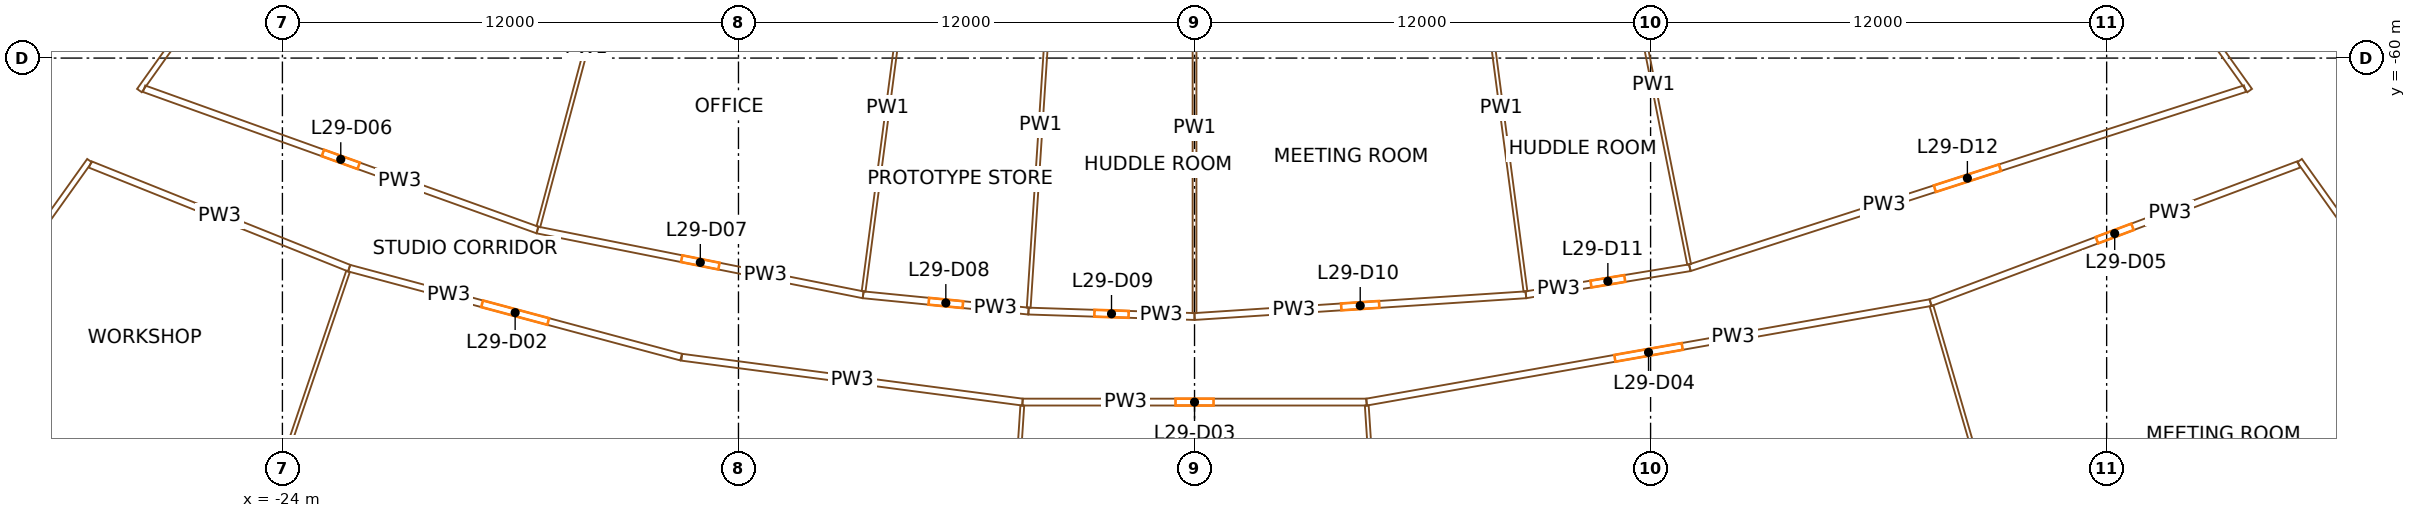
"""IFC4 building model, lengths in metres.
Left out: names, types, materials, properties, quantities, classifications, styles, units other than length and angle.
Written with IfcOpenShell. Run it as: python <this file> out.ifc"""

import sys

from ifc_helpers import new_model, si_unit, direction, frame, frame_2d, origin, place, context, subcontext, project, spatial, rectangle, extrude, element, fill, save


model = new_model("IFC4")
c1 = context("Model", 3, precision=1e-05, world=origin(), true_north=direction((0.0, 1.0)))
c2 = subcontext(c1, "Body", "Model", "MODEL_VIEW")
j1 = project(units=[si_unit("LENGTHUNIT", "METRE"), si_unit("PLANEANGLEUNIT", "RADIAN")], contexts=[c1])
p1 = place(None, origin())
s1 = spatial("IfcSite", under=j1, at=p1, CompositionType="ELEMENT")
p2 = place(p1, origin())
s2 = spatial("IfcBuilding", under=s1, at=p2, CompositionType="ELEMENT")
p3 = place(p2, frame((0.0, 0.0, 129.1)))
s3 = spatial("IfcBuildingStorey", under=s2, at=p3, CompositionType="ELEMENT", Elevation=129.1)
p4 = place(p3, frame((-36.717, -66.337, 0.0), z_axis=(0.0, 0.0, 1.0), x_axis=(0.573577477574, 0.819151315216, 0.0)))
e1 = element("IfcWall", 1, at=p4, inside=s3, PredefinedType="SHEAR", context=c2, shape_type="SweptSolid", body=[
    extrude(rectangle(XDim=14.8, YDim=0.9, at=frame_2d((7.4, 0.0))), origin(), (0.0, 0.0, 1.0), 3.5),
])
p5 = place(p4, frame((6.2, 0.0, 0.0)))
e2 = element("IfcOpeningElement", 2, at=p5, cuts=e1, PredefinedType="OPENING", context=c2, shape_type="SweptSolid", body=[
    extrude(rectangle(XDim=2.4, YDim=2.1, at=frame_2d((1.2, 1.05))), frame((0.0, 0.46, 0.0), z_axis=(0.0, -1.0, 0.0), x_axis=(1.0, 0.0, 0.0)), (0.0, 0.0, 1.0), 0.92),
])
p6 = place(p3, frame((36.717, -66.337, 0.0), z_axis=(0.0, 0.0, 1.0), x_axis=(-0.573577477574, 0.819151315216, 0.0)))
e3 = element("IfcWall", 3, at=p6, inside=s3, PredefinedType="SHEAR", context=c2, shape_type="SweptSolid", body=[
    extrude(rectangle(XDim=14.8, YDim=0.9, at=frame_2d((7.4, 0.0))), origin(), (0.0, 0.0, 1.0), 3.5),
])
p7 = place(p6, frame((6.2, 0.0, 0.0)))
e4 = element("IfcOpeningElement", 4, at=p7, cuts=e3, PredefinedType="OPENING", context=c2, shape_type="SweptSolid", body=[
    extrude(rectangle(XDim=2.4, YDim=2.1, at=frame_2d((1.2, 1.05))), frame((0.0, 0.46, 0.0), z_axis=(0.0, -1.0, 0.0), x_axis=(1.0, 0.0, 0.0)), (0.0, 0.0, 1.0), 0.92),
])
p8 = place(p3, frame((-29.075, -62.698, 0.0), z_axis=(0.0, 0.0, 1.0), x_axis=(-0.58002146853, -0.814601188339, 0.0)))
e5 = element("IfcWall", 5, at=p8, inside=s3, PredefinedType="PARTITIONING", context=c2, shape_type="SweptSolid", body=[
    extrude(rectangle(XDim=10.141, YDim=0.15, at=frame_2d((5.071, 0.0))), origin(), (0.0, 0.0, 1.0), 2.4),
])
p9 = place(p8, frame((4.571, 0.0, 0.0)))
e6 = element("IfcOpeningElement", 6, at=p9, cuts=e5, PredefinedType="OPENING", context=c2, shape_type="SweptSolid", body=[
    extrude(rectangle(XDim=1.0, YDim=2.1, at=frame_2d((0.5, 1.05))), frame((0.0, 0.085, 0.0), z_axis=(0.0, -1.0, 0.0), x_axis=(1.0, 0.0, 0.0)), (0.0, 0.0, 1.0), 0.17),
])
p10 = place(p3, frame((-29.058, -62.799, 0.0), z_axis=(0.0, 0.0, 1.0), x_axis=(0.92834358791, -0.371723261025, 0.0)))
e7 = element("IfcWall", 7, at=p10, inside=s3, PredefinedType="PARTITIONING", context=c2, shape_type="SweptSolid", body=[
    extrude(rectangle(XDim=7.34, YDim=0.18, at=frame_2d((3.67, 0.0))), origin(), (0.0, 0.0, 1.0), 2.4),
])
p11 = place(p3, frame((-27.64, -60.807, 0.0), z_axis=(0.0, 0.0, 1.0), x_axis=(0.941150861554, -0.337986768669, 0.0)))
e8 = element("IfcWall", 8, at=p11, inside=s3, PredefinedType="PARTITIONING", context=c2, shape_type="SweptSolid", body=[
    extrude(rectangle(XDim=10.998, YDim=0.18, at=frame_2d((5.499, 0.0))), origin(), (0.0, 0.0, 1.0), 2.4),
])
p12 = place(p11, frame((4.999, 0.0, 0.0)))
e9 = element("IfcOpeningElement", 9, at=p12, cuts=e8, PredefinedType="OPENING", context=c2, shape_type="SweptSolid", body=[
    extrude(rectangle(XDim=1.0, YDim=2.1, at=frame_2d((0.5, 1.05))), frame((0.0, 0.1, 0.0), z_axis=(0.0, -1.0, 0.0), x_axis=(1.0, 0.0, 0.0)), (0.0, 0.0, 1.0), 0.2),
])
p13 = place(p3, frame((-25.426, -74.902, 0.0), z_axis=(0.0, 0.0, 1.0), x_axis=(0.321441806318, 0.946929334824, 0.0)))
e10 = element("IfcWall", 10, at=p13, inside=s3, PredefinedType="PARTITIONING", context=c2, shape_type="SweptSolid", body=[
    extrude(rectangle(XDim=9.81, YDim=0.1, at=frame_2d((4.905, 0.0))), origin(), (0.0, 0.0, 1.0), 2.4),
])
p14 = place(p3, frame((-13.509, -67.868, 0.0), z_axis=(0.0, 0.0, 1.0), x_axis=(-0.965930457668, 0.258801759942, 0.0)))
e11 = element("IfcWall", 11, at=p14, inside=s3, PredefinedType="PARTITIONING", context=c2, shape_type="SweptSolid", body=[
    extrude(rectangle(XDim=9.043, YDim=0.18, at=frame_2d((4.521, 0.0))), origin(), (0.0, 0.0, 1.0), 2.4),
])
p15 = place(p14, frame((3.621, 0.0, 0.0)))
e12 = element("IfcOpeningElement", 12, at=p15, cuts=e11, PredefinedType="OPENING", context=c2, shape_type="SweptSolid", body=[
    extrude(rectangle(XDim=1.8, YDim=2.1, at=frame_2d((0.9, 1.05))), frame((0.0, 0.1, 0.0), z_axis=(0.0, -1.0, 0.0), x_axis=(1.0, 0.0, 0.0)), (0.0, 0.0, 1.0), 0.2),
])
p16 = place(p3, frame((-21.884, -52.598, 0.0), z_axis=(0.0, 0.0, 1.0), x_axis=(-0.580023139251, -0.814599998732, 0.0)))
e13 = element("IfcWall", 13, at=p16, inside=s3, PredefinedType="PARTITIONING", context=c2, shape_type="SweptSolid", body=[
    extrude(rectangle(XDim=10.136, YDim=0.15, at=frame_2d((5.068, 0.0))), origin(), (0.0, 0.0, 1.0), 2.4),
])
p17 = place(p3, frame((-17.289, -64.524, 0.0), z_axis=(0.0, 0.0, 1.0), x_axis=(0.980786466832, -0.195084357342, 0.0)))
e14 = element("IfcWall", 14, at=p17, inside=s3, PredefinedType="PARTITIONING", context=c2, shape_type="SweptSolid", body=[
    extrude(rectangle(XDim=8.738, YDim=0.18, at=frame_2d((4.369, 0.0))), origin(), (0.0, 0.0, 1.0), 2.4),
])
p18 = place(p17, frame((3.869, 0.0, 0.0)))
e15 = element("IfcOpeningElement", 15, at=p18, cuts=e14, PredefinedType="OPENING", context=c2, shape_type="SweptSolid", body=[
    extrude(rectangle(XDim=1.0, YDim=2.1, at=frame_2d((0.5, 1.05))), frame((0.0, 0.1, 0.0), z_axis=(0.0, -1.0, 0.0), x_axis=(1.0, 0.0, 0.0)), (0.0, 0.0, 1.0), 0.2),
])
p19 = place(p3, frame((-14.747, -55.037, 0.0), z_axis=(0.0, 0.0, 1.0), x_axis=(-0.258828880572, -0.965923190829, 0.0)))
e16 = element("IfcWall", 16, at=p19, inside=s3, PredefinedType="PARTITIONING", context=c2, shape_type="SweptSolid", body=[
    extrude(rectangle(XDim=9.731, YDim=0.1, at=frame_2d((4.866, 0.0))), origin(), (0.0, 0.0, 1.0), 2.4),
])
p20 = place(p3, frame((-13.491, -67.872, 0.0), z_axis=(0.0, 0.0, 1.0), x_axis=(0.991447218368, -0.130508287819, 0.0)))
e17 = element("IfcWall", 17, at=p20, inside=s3, PredefinedType="PARTITIONING", context=c2, shape_type="SweptSolid", body=[
    extrude(rectangle(XDim=9.043, YDim=0.18, at=frame_2d((4.521, 0.0))), origin(), (0.0, 0.0, 1.0), 2.4),
])
p21 = place(p3, frame((-8.719, -66.229, 0.0), z_axis=(0.0, 0.0, 1.0), x_axis=(0.995184826457, -0.098016127192, 0.0)))
e18 = element("IfcWall", 18, at=p21, inside=s3, PredefinedType="PARTITIONING", context=c2, shape_type="SweptSolid", body=[
    extrude(rectangle(XDim=4.371, YDim=0.18, at=frame_2d((2.186, 0.0))), origin(), (0.0, 0.0, 1.0), 2.4),
])
p22 = place(p21, frame((1.736, 0.0, 0.0)))
e19 = element("IfcOpeningElement", 19, at=p22, cuts=e18, PredefinedType="OPENING", context=c2, shape_type="SweptSolid", body=[
    extrude(rectangle(XDim=0.9, YDim=2.1, at=frame_2d((0.45, 1.05))), frame((0.0, 0.1, 0.0), z_axis=(0.0, -1.0, 0.0), x_axis=(1.0, 0.0, 0.0)), (0.0, 0.0, 1.0), 0.2),
])
p23 = place(p3, frame((-7.437, -56.491, 0.0), z_axis=(0.0, 0.0, 1.0), x_axis=(-0.130531739513, -0.991444131043, 0.0)))
e20 = element("IfcWall", 20, at=p23, inside=s3, PredefinedType="PARTITIONING", context=c2, shape_type="SweptSolid", body=[
    extrude(rectangle(XDim=9.731, YDim=0.1, at=frame_2d((4.866, 0.0))), origin(), (0.0, 0.0, 1.0), 2.4),
])
p24 = place(p3, frame((-5.173, -78.931, 0.0), z_axis=(0.0, 0.0, 1.0), x_axis=(0.065402368846, 0.997858973077, 0.0)))
e21 = element("IfcWall", 21, at=p24, inside=s3, PredefinedType="PARTITIONING", context=c2, shape_type="SweptSolid", body=[
    extrude(rectangle(XDim=9.81, YDim=0.1, at=frame_2d((4.905, 0.0))), origin(), (0.0, 0.0, 1.0), 2.4),
])
p25 = place(p3, frame((4.526, -69.052, 0.0), z_axis=(0.0, 0.0, 1.0), x_axis=(-1.0, 0.0, 0.0)))
e22 = element("IfcWall", 22, at=p25, inside=s3, PredefinedType="PARTITIONING", context=c2, shape_type="SweptSolid", body=[
    extrude(rectangle(XDim=9.052, YDim=0.18, at=frame_2d((4.526, 0.0))), origin(), (0.0, 0.0, 1.0), 2.4),
])
p26 = place(p25, frame((4.026, 0.0, 0.0)))
e23 = element("IfcOpeningElement", 23, at=p26, cuts=e22, PredefinedType="OPENING", context=c2, shape_type="SweptSolid", body=[
    extrude(rectangle(XDim=1.0, YDim=2.1, at=frame_2d((0.5, 1.05))), frame((0.0, 0.1, 0.0), z_axis=(0.0, -1.0, 0.0), x_axis=(1.0, 0.0, 0.0)), (0.0, 0.0, 1.0), 0.2),
])
p27 = place(p3, frame((-4.369, -66.657, 0.0), z_axis=(0.0, 0.0, 1.0), x_axis=(0.99946426167, -0.03272903366, 0.0)))
e24 = element("IfcWall", 24, at=p27, inside=s3, PredefinedType="PARTITIONING", context=c2, shape_type="SweptSolid", body=[
    extrude(rectangle(XDim=4.371, YDim=0.18, at=frame_2d((2.186, 0.0))), origin(), (0.0, 0.0, 1.0), 2.4),
])
p28 = place(p27, frame((1.736, 0.0, 0.0)))
e25 = element("IfcOpeningElement", 25, at=p28, cuts=e24, PredefinedType="OPENING", context=c2, shape_type="SweptSolid", body=[
    extrude(rectangle(XDim=0.9, YDim=2.1, at=frame_2d((0.45, 1.05))), frame((0.0, 0.1, 0.0), z_axis=(0.0, -1.0, 0.0), x_axis=(1.0, 0.0, 0.0)), (0.0, 0.0, 1.0), 0.2),
])
p29 = place(p3, frame((-3.735, -56.978, 0.0), z_axis=(0.0, 0.0, 1.0), x_axis=(-0.065392602582, -0.997859613136, 0.0)))
e26 = element("IfcWall", 26, at=p29, inside=s3, PredefinedType="PARTITIONING", context=c2, shape_type="SweptSolid", body=[
    extrude(rectangle(XDim=9.61, YDim=0.1, at=frame_2d((4.805, 0.0))), origin(), (0.0, 0.0, 1.0), 2.4),
])
p30 = place(p3, frame((0.0, -66.8, 0.0), z_axis=(0.0, 0.0, 1.0), x_axis=(0.997858593599, 0.065408158359, 0.0)))
e27 = element("IfcWall", 27, at=p30, inside=s3, PredefinedType="PARTITIONING", context=c2, shape_type="SweptSolid", body=[
    extrude(rectangle(XDim=8.738, YDim=0.18, at=frame_2d((4.369, 0.0))), origin(), (0.0, 0.0, 1.0), 2.4),
])
p31 = place(p30, frame((3.869, 0.0, 0.0)))
e28 = element("IfcOpeningElement", 28, at=p31, cuts=e27, PredefinedType="OPENING", context=c2, shape_type="SweptSolid", body=[
    extrude(rectangle(XDim=1.0, YDim=2.1, at=frame_2d((0.5, 1.05))), frame((0.0, 0.1, 0.0), z_axis=(0.0, -1.0, 0.0), x_axis=(1.0, 0.0, 0.0)), (0.0, 0.0, 1.0), 0.2),
])
p32 = place(p3, frame((0.0, -56.979, 0.0), z_axis=(0.0, 0.0, 1.0), x_axis=(0.0, -1.0, 0.0)))
e29 = element("IfcWall", 29, at=p32, inside=s3, PredefinedType="PARTITIONING", context=c2, shape_type="SweptSolid", body=[
    extrude(rectangle(XDim=9.731, YDim=0.1, at=frame_2d((4.866, 0.0))), origin(), (0.0, 0.0, 1.0), 2.4),
])
p33 = place(p3, frame((19.366, -66.435, 0.0), z_axis=(0.0, 0.0, 1.0), x_axis=(-0.984805080703, -0.173663332402, 0.0)))
e30 = element("IfcWall", 30, at=p33, inside=s3, PredefinedType="PARTITIONING", context=c2, shape_type="SweptSolid", body=[
    extrude(rectangle(XDim=15.069, YDim=0.18, at=frame_2d((7.535, 0.0))), origin(), (0.0, 0.0, 1.0), 2.4),
])
p34 = place(p33, frame((6.635, 0.0, 0.0)))
e31 = element("IfcOpeningElement", 31, at=p34, cuts=e30, PredefinedType="OPENING", context=c2, shape_type="SweptSolid", body=[
    extrude(rectangle(XDim=1.8, YDim=2.1, at=frame_2d((0.9, 1.05))), frame((0.0, 0.1, 0.0), z_axis=(0.0, -1.0, 0.0), x_axis=(1.0, 0.0, 0.0)), (0.0, 0.0, 1.0), 0.2),
])
p35 = place(p3, frame((5.173, -78.931, 0.0), z_axis=(0.0, 0.0, 1.0), x_axis=(-0.065402368846, 0.997858973077, 0.0)))
e32 = element("IfcWall", 32, at=p35, inside=s3, PredefinedType="PARTITIONING", context=c2, shape_type="SweptSolid", body=[
    extrude(rectangle(XDim=9.81, YDim=0.1, at=frame_2d((4.905, 0.0))), origin(), (0.0, 0.0, 1.0), 2.4),
])
p36 = place(p3, frame((7.437, -56.491, 0.0), z_axis=(0.0, 0.0, 1.0), x_axis=(0.130531739513, -0.991444131043, 0.0)))
e33 = element("IfcWall", 33, at=p36, inside=s3, PredefinedType="PARTITIONING", context=c2, shape_type="SweptSolid", body=[
    extrude(rectangle(XDim=9.731, YDim=0.1, at=frame_2d((4.866, 0.0))), origin(), (0.0, 0.0, 1.0), 2.4),
])
p37 = place(p3, frame((8.719, -66.229, 0.0), z_axis=(0.0, 0.0, 1.0), x_axis=(0.986638873051, 0.162922479065, 0.0)))
e34 = element("IfcWall", 34, at=p37, inside=s3, PredefinedType="PARTITIONING", context=c2, shape_type="SweptSolid", body=[
    extrude(rectangle(XDim=4.371, YDim=0.18, at=frame_2d((2.186, 0.0))), origin(), (0.0, 0.0, 1.0), 2.4),
])
p38 = place(p37, frame((1.736, 0.0, 0.0)))
e35 = element("IfcOpeningElement", 35, at=p38, cuts=e34, PredefinedType="OPENING", context=c2, shape_type="SweptSolid", body=[
    extrude(rectangle(XDim=0.9, YDim=2.1, at=frame_2d((0.45, 1.05))), frame((0.0, 0.1, 0.0), z_axis=(0.0, -1.0, 0.0), x_axis=(1.0, 0.0, 0.0)), (0.0, 0.0, 1.0), 0.2),
])
p39 = place(p3, frame((11.14, -56.003, 0.0), z_axis=(0.0, 0.0, 1.0), x_axis=(0.195085169116, -0.980786305365, 0.0)))
e36 = element("IfcWall", 36, at=p39, inside=s3, PredefinedType="PARTITIONING", context=c2, shape_type="SweptSolid", body=[
    extrude(rectangle(XDim=9.61, YDim=0.1, at=frame_2d((4.805, 0.0))), origin(), (0.0, 0.0, 1.0), 2.4),
])
p40 = place(p3, frame((13.032, -65.516, 0.0), z_axis=(0.0, 0.0, 1.0), x_axis=(0.951705469381, 0.307012539729, 0.0)))
e37 = element("IfcWall", 37, at=p40, inside=s3, PredefinedType="PARTITIONING", context=c2, shape_type="SweptSolid", body=[
    extrude(rectangle(XDim=15.348, YDim=0.18, at=frame_2d((7.674, 0.0))), origin(), (0.0, 0.0, 1.0), 2.4),
])
p41 = place(p40, frame((6.774, 0.0, 0.0)))
e38 = element("IfcOpeningElement", 38, at=p41, cuts=e37, PredefinedType="OPENING", context=c2, shape_type="SweptSolid", body=[
    extrude(rectangle(XDim=1.8, YDim=2.1, at=frame_2d((0.9, 1.05))), frame((0.0, 0.1, 0.0), z_axis=(0.0, -1.0, 0.0), x_axis=(1.0, 0.0, 0.0)), (0.0, 0.0, 1.0), 0.2),
])
p42 = place(p3, frame((29.057, -62.798, 0.0), z_axis=(0.0, 0.0, 1.0), x_axis=(-0.936236096431, -0.351371557956, 0.0)))
e39 = element("IfcWall", 39, at=p42, inside=s3, PredefinedType="PARTITIONING", context=c2, shape_type="SweptSolid", body=[
    extrude(rectangle(XDim=10.352, YDim=0.18, at=frame_2d((5.176, 0.0))), origin(), (0.0, 0.0, 1.0), 2.4),
])
p43 = place(p42, frame((4.676, 0.0, 0.0)))
e40 = element("IfcOpeningElement", 40, at=p43, cuts=e39, PredefinedType="OPENING", context=c2, shape_type="SweptSolid", body=[
    extrude(rectangle(XDim=1.0, YDim=2.1, at=frame_2d((0.5, 1.05))), frame((0.0, 0.1, 0.0), z_axis=(0.0, -1.0, 0.0), x_axis=(1.0, 0.0, 0.0)), (0.0, 0.0, 1.0), 0.2),
])
p44 = place(p3, frame((21.884, -52.598, 0.0), z_axis=(0.0, 0.0, 1.0), x_axis=(0.580023139251, -0.814599998732, 0.0)))
e41 = element("IfcWall", 41, at=p44, inside=s3, PredefinedType="PARTITIONING", context=c2, shape_type="SweptSolid", body=[
    extrude(rectangle(XDim=10.136, YDim=0.15, at=frame_2d((5.068, 0.0))), origin(), (0.0, 0.0, 1.0), 2.4),
])
p45 = place(p3, frame((22.094, -75.794, 0.0), z_axis=(0.0, 0.0, 1.0), x_axis=(-0.279851497416, 0.960043300791, 0.0)))
e42 = element("IfcWall", 42, at=p45, inside=s3, PredefinedType="PARTITIONING", context=c2, shape_type="SweptSolid", body=[
    extrude(rectangle(XDim=9.659, YDim=0.1, at=frame_2d((4.83, 0.0))), origin(), (0.0, 0.0, 1.0), 2.4),
])
p46 = place(p3, frame((29.075, -62.698, 0.0), z_axis=(0.0, 0.0, 1.0), x_axis=(0.58002146853, -0.814601188339, 0.0)))
e43 = element("IfcWall", 43, at=p46, inside=s3, PredefinedType="PARTITIONING", context=c2, shape_type="SweptSolid", body=[
    extrude(rectangle(XDim=10.141, YDim=0.15, at=frame_2d((5.071, 0.0))), origin(), (0.0, 0.0, 1.0), 2.4),
])
p47 = place(p15, origin())
e44 = element("IfcDoor", 44, at=p47, inside=s3, OperationType="DOUBLE_DOOR_SINGLE_SWING", PredefinedType="DOOR", context=c2, shape_type="SweptSolid", body=[
    extrude(rectangle(XDim=1.8, YDim=2.1, at=frame_2d((0.9, 1.05))), frame((0.0, 0.025, 0.0), z_axis=(0.0, -1.0, 0.0), x_axis=(1.0, 0.0, 0.0)), (0.0, 0.0, 1.0), 0.05),
])
fill(e12, e44)
p48 = place(p26, origin())
e45 = element("IfcDoor", 45, at=p48, inside=s3, OperationType="SINGLE_SWING_RIGHT", PredefinedType="DOOR", context=c2, shape_type="SweptSolid", body=[
    extrude(rectangle(XDim=1.0, YDim=2.1, at=frame_2d((0.5, 1.05))), frame((0.0, 0.025, 0.0), z_axis=(0.0, -1.0, 0.0), x_axis=(1.0, 0.0, 0.0)), (0.0, 0.0, 1.0), 0.05),
])
fill(e23, e45)
p49 = place(p34, origin())
e46 = element("IfcDoor", 46, at=p49, inside=s3, OperationType="DOUBLE_DOOR_SINGLE_SWING", PredefinedType="DOOR", context=c2, shape_type="SweptSolid", body=[
    extrude(rectangle(XDim=1.8, YDim=2.1, at=frame_2d((0.9, 1.05))), frame((0.0, 0.025, 0.0), z_axis=(0.0, -1.0, 0.0), x_axis=(1.0, 0.0, 0.0)), (0.0, 0.0, 1.0), 0.05),
])
fill(e31, e46)
p50 = place(p43, origin())
e47 = element("IfcDoor", 47, at=p50, inside=s3, OperationType="SINGLE_SWING_RIGHT", PredefinedType="DOOR", context=c2, shape_type="SweptSolid", body=[
    extrude(rectangle(XDim=1.0, YDim=2.1, at=frame_2d((0.5, 1.05))), frame((0.0, 0.025, 0.0), z_axis=(0.0, -1.0, 0.0), x_axis=(1.0, 0.0, 0.0)), (0.0, 0.0, 1.0), 0.05),
])
fill(e40, e47)
p51 = place(p12, origin())
e48 = element("IfcDoor", 48, at=p51, inside=s3, OperationType="SINGLE_SWING_RIGHT", PredefinedType="DOOR", context=c2, shape_type="SweptSolid", body=[
    extrude(rectangle(XDim=1.0, YDim=2.1, at=frame_2d((0.5, 1.05))), frame((0.0, 0.025, 0.0), z_axis=(0.0, -1.0, 0.0), x_axis=(1.0, 0.0, 0.0)), (0.0, 0.0, 1.0), 0.05),
])
fill(e9, e48)
p52 = place(p18, origin())
e49 = element("IfcDoor", 49, at=p52, inside=s3, OperationType="SINGLE_SWING_RIGHT", PredefinedType="DOOR", context=c2, shape_type="SweptSolid", body=[
    extrude(rectangle(XDim=1.0, YDim=2.1, at=frame_2d((0.5, 1.05))), frame((0.0, 0.025, 0.0), z_axis=(0.0, -1.0, 0.0), x_axis=(1.0, 0.0, 0.0)), (0.0, 0.0, 1.0), 0.05),
])
fill(e15, e49)
p53 = place(p22, origin())
e50 = element("IfcDoor", 50, at=p53, inside=s3, OperationType="SINGLE_SWING_RIGHT", PredefinedType="DOOR", context=c2, shape_type="SweptSolid", body=[
    extrude(rectangle(XDim=0.9, YDim=2.1, at=frame_2d((0.45, 1.05))), frame((0.0, 0.025, 0.0), z_axis=(0.0, -1.0, 0.0), x_axis=(1.0, 0.0, 0.0)), (0.0, 0.0, 1.0), 0.05),
])
fill(e19, e50)
p54 = place(p28, origin())
e51 = element("IfcDoor", 51, at=p54, inside=s3, OperationType="SINGLE_SWING_RIGHT", PredefinedType="DOOR", context=c2, shape_type="SweptSolid", body=[
    extrude(rectangle(XDim=0.9, YDim=2.1, at=frame_2d((0.45, 1.05))), frame((0.0, 0.025, 0.0), z_axis=(0.0, -1.0, 0.0), x_axis=(1.0, 0.0, 0.0)), (0.0, 0.0, 1.0), 0.05),
])
fill(e25, e51)
p55 = place(p31, origin())
e52 = element("IfcDoor", 52, at=p55, inside=s3, OperationType="SINGLE_SWING_RIGHT", PredefinedType="DOOR", context=c2, shape_type="SweptSolid", body=[
    extrude(rectangle(XDim=1.0, YDim=2.1, at=frame_2d((0.5, 1.05))), frame((0.0, 0.025, 0.0), z_axis=(0.0, -1.0, 0.0), x_axis=(1.0, 0.0, 0.0)), (0.0, 0.0, 1.0), 0.05),
])
fill(e28, e52)
p56 = place(p38, origin())
e53 = element("IfcDoor", 53, at=p56, inside=s3, OperationType="SINGLE_SWING_RIGHT", PredefinedType="DOOR", context=c2, shape_type="SweptSolid", body=[
    extrude(rectangle(XDim=0.9, YDim=2.1, at=frame_2d((0.45, 1.05))), frame((0.0, 0.025, 0.0), z_axis=(0.0, -1.0, 0.0), x_axis=(1.0, 0.0, 0.0)), (0.0, 0.0, 1.0), 0.05),
])
fill(e35, e53)
p57 = place(p41, origin())
e54 = element("IfcDoor", 54, at=p57, inside=s3, OperationType="DOUBLE_DOOR_SINGLE_SWING", PredefinedType="DOOR", context=c2, shape_type="SweptSolid", body=[
    extrude(rectangle(XDim=1.8, YDim=2.1, at=frame_2d((0.9, 1.05))), frame((0.0, 0.025, 0.0), z_axis=(0.0, -1.0, 0.0), x_axis=(1.0, 0.0, 0.0)), (0.0, 0.0, 1.0), 0.05),
])
fill(e38, e54)
save(model, sys.argv[1])
